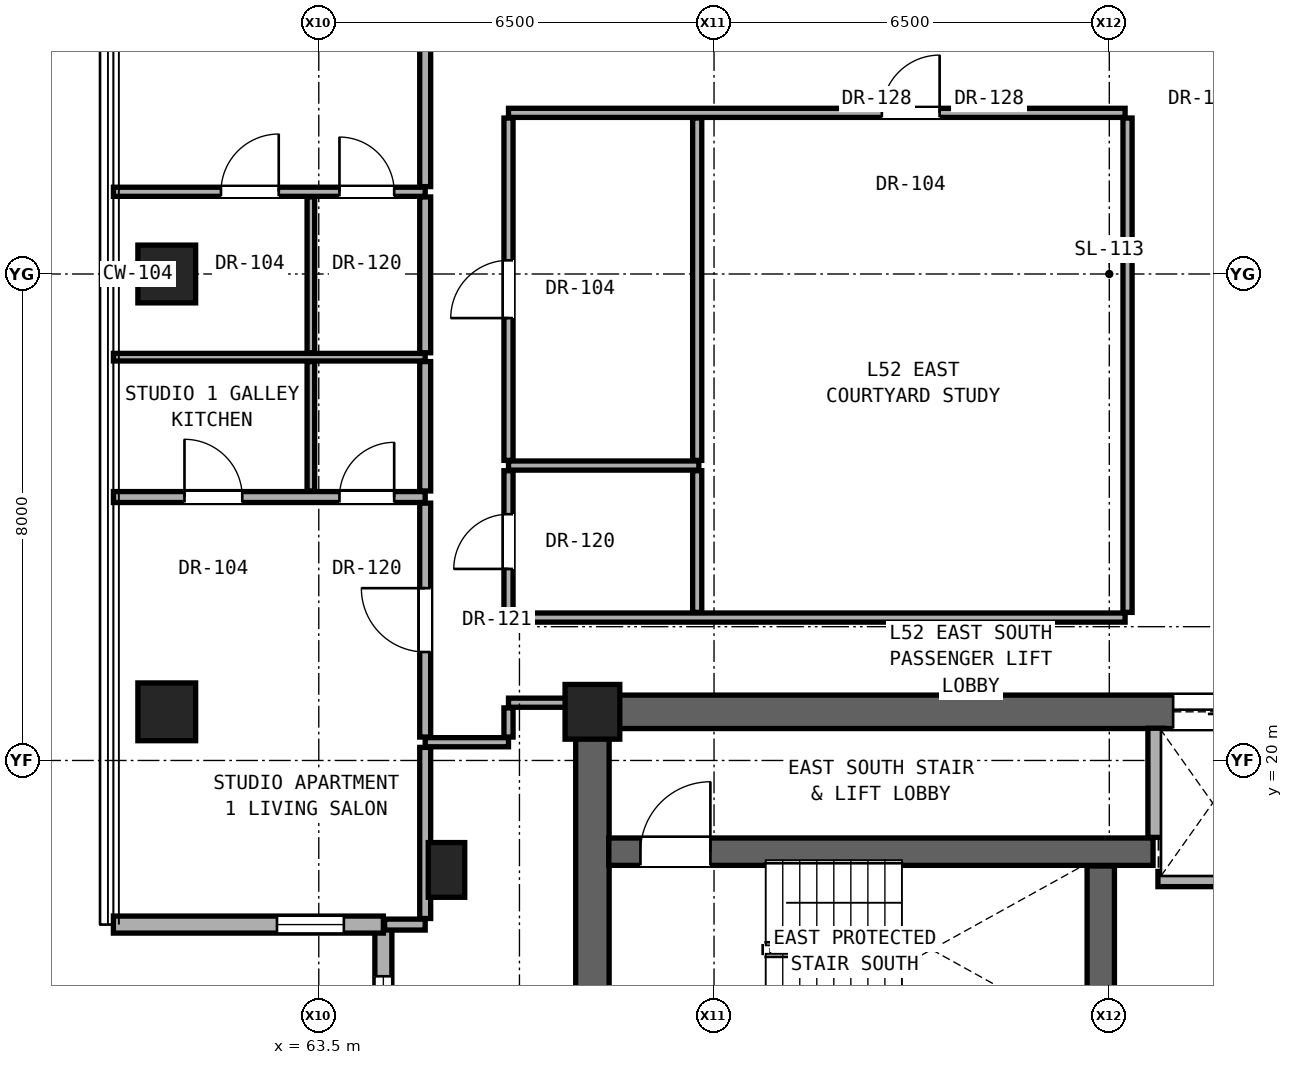
"""IFC4 building model, lengths in metres.
Left out: names, types, materials, properties, quantities, classifications, styles, units other than length and angle.
Written with IfcOpenShell. Run it as: python <this file> out.ifc"""

import sys

from ifc_helpers import new_model, si_unit, direction, frame, frame_2d, origin, origin_2d, place, context, subcontext, project, spatial, rectangle, hollow_rectangle, extrude, element, fill, save


model = new_model("IFC4")
c1 = context("Model", 3, precision=1e-05, world=origin(), true_north=direction((0.0, 1.0)))
c2 = subcontext(c1, "Body", "Model", "MODEL_VIEW")
j1 = project(units=[si_unit("LENGTHUNIT", "METRE"), si_unit("PLANEANGLEUNIT", "RADIAN")], contexts=[c1])
p1 = place(None, origin())
s1 = spatial("IfcSite", under=j1, at=p1, CompositionType="ELEMENT")
p2 = place(p1, origin())
s2 = spatial("IfcBuilding", under=s1, at=p2, CompositionType="ELEMENT")
p3 = place(p2, frame((0.0, 0.0, 183.65)))
s3 = spatial("IfcBuildingStorey", under=s2, at=p3, CompositionType="ELEMENT", Elevation=183.65)
p4 = place(p3, frame((68.0, 20.8, 0.0), z_axis=(0.0, 0.0, 1.0), x_axis=(1.0, 0.0, 0.0)))
e1 = element("IfcColumn", 1, at=p4, inside=s3, PredefinedType="COLUMN", context=c2, shape_type="SweptSolid", body=[
    extrude(rectangle(XDim=0.9, YDim=0.9, at=origin_2d()), origin(), (0.0, 0.0, 1.0), 3.25),
])
for number, where, z_axis, x_axis in (
    (2, (61.0, 20.8, 0.0), (0.0, 0.0, 1.0), (1.0, 0.0, 0.0)),
    (3, (61.0, 28.0, 0.0), (0.0, 0.0, 1.0), (1.0, 0.0, 0.0)),
):
    element("IfcColumn", number, at=place(p3, frame(where, z_axis=z_axis, x_axis=x_axis)), inside=s3, PredefinedType="COLUMN", context=c2, shape_type="SweptSolid", body=[
        extrude(hollow_rectangle(XDim=0.95, YDim=0.95, WallThickness=0.05, at=origin_2d()), origin(), (0.0, 0.0, 1.0), 3.25),
    ])
p5 = place(p3, frame((65.6, 18.2, 0.0), z_axis=(0.0, 0.0, 1.0), x_axis=(1.0, 0.0, 0.0)))
e4 = element("IfcColumn", 4, at=p5, inside=s3, PredefinedType="PILASTER", context=c2, shape_type="SweptSolid", body=[
    extrude(rectangle(XDim=0.6, YDim=0.9, at=origin_2d()), origin(), (0.0, 0.0, 1.0), 3.25),
])
p6 = place(p3, frame((68.0, 15.2, 0.0), z_axis=(0.0, 0.0, 1.0), x_axis=(0.0, 1.0, 0.0)))
e5 = element("IfcWall", 5, at=p6, inside=s3, PredefinedType="SHEAR", context=c2, shape_type="SweptSolid", body=[
    extrude(rectangle(XDim=5.6, YDim=0.55, at=frame_2d((2.8, 0.0))), origin(), (0.0, 0.0, 1.0), 3.05),
])
p7 = place(p3, frame((68.0, 20.8, 0.0), z_axis=(0.0, 0.0, 1.0), x_axis=(1.0, 0.0, 0.0)))
e6 = element("IfcWall", 6, at=p7, inside=s3, PredefinedType="SHEAR", context=c2, shape_type="SweptSolid", body=[
    extrude(rectangle(XDim=17.0, YDim=0.55, at=frame_2d((8.5, 0.0))), origin(), (0.0, 0.0, 1.0), 3.05),
])
p8 = place(p7, frame((9.55, 0.0, 0.0)))
e7 = element("IfcOpeningElement", 7, at=p8, cuts=e6, PredefinedType="OPENING", context=c2, shape_type="SweptSolid", body=[
    extrude(rectangle(XDim=1.3, YDim=2.3, at=frame_2d((0.65, 1.15))), frame((0.0, 0.285, 0.0), z_axis=(0.0, -1.0, 0.0), x_axis=(1.0, 0.0, 0.0)), (0.0, 0.0, 1.0), 0.57),
])
p9 = place(p7, frame((12.05, 0.0, 0.0)))
e8 = element("IfcOpeningElement", 8, at=p9, cuts=e6, PredefinedType="OPENING", context=c2, shape_type="SweptSolid", body=[
    extrude(rectangle(XDim=1.3, YDim=2.3, at=frame_2d((0.65, 1.15))), frame((0.0, 0.285, 0.0), z_axis=(0.0, -1.0, 0.0), x_axis=(1.0, 0.0, 0.0)), (0.0, 0.0, 1.0), 0.57),
])
p10 = place(p3, frame((64.562, 17.301, 0.0), z_axis=(0.0, 0.0, 1.0), x_axis=(0.0, -1.0, 0.0)))
e9 = element("IfcWall", 9, at=p10, inside=s3, PredefinedType="SOLIDWALL", context=c2, shape_type="SweptSolid", body=[
    extrude(rectangle(XDim=4.44, YDim=0.28, at=frame_2d((2.22, 0.0))), origin(), (0.0, 0.0, 1.0), 3.03),
])
p11 = place(p10, frame((0.85, 0.0, 0.68)))
e10 = element("IfcOpeningElement", 10, at=p11, cuts=e9, PredefinedType="OPENING", context=c2, shape_type="SweptSolid", body=[
    extrude(rectangle(XDim=2.1, YDim=2.2, at=frame_2d((1.05, 1.1))), frame((0.0, 0.15, 0.0), z_axis=(0.0, -1.0, 0.0), x_axis=(1.0, 0.0, 0.0)), (0.0, 0.0, 1.0), 0.3),
])
p12 = place(p3, frame((60.123, 17.301, 0.0), z_axis=(0.0, 0.0, 1.0), x_axis=(1.0, 0.0, 0.0)))
e11 = element("IfcWall", 11, at=p12, inside=s3, PredefinedType="SOLIDWALL", context=c2, shape_type="SweptSolid", body=[
    extrude(rectangle(XDim=4.44, YDim=0.28, at=frame_2d((2.22, 0.0))), origin(), (0.0, 0.0, 1.0), 3.03),
])
p13 = place(p12, frame((2.69, 0.0, 0.85)))
e12 = element("IfcOpeningElement", 12, at=p13, cuts=e11, PredefinedType="OPENING", context=c2, shape_type="SweptSolid", body=[
    extrude(rectangle(XDim=1.1, YDim=2.0, at=frame_2d((0.55, 1.0))), frame((0.0, 0.15, 0.0), z_axis=(0.0, -1.0, 0.0), x_axis=(1.0, 0.0, 0.0)), (0.0, 0.0, 1.0), 0.3),
])
p14 = place(p3, frame((64.582, 17.301, 0.0), z_axis=(0.0, 0.0, 1.0), x_axis=(1.0, 0.0, 0.0)))
e13 = element("IfcWall", 13, at=p14, inside=s3, PredefinedType="PARTITIONING", context=c2, shape_type="SweptSolid", body=[
    extrude(rectangle(XDim=0.668, YDim=0.18, at=frame_2d((0.334, 0.0))), origin(), (0.0, 0.0, 1.0), 3.05),
])
p15 = place(p3, frame((77.3, 18.05, 0.0), z_axis=(0.0, 0.0, 1.0), x_axis=(1.0, 0.0, 0.0)))
e14 = element("IfcWall", 14, at=p15, inside=s3, PredefinedType="SOLIDWALL", context=c2, shape_type="SweptSolid", body=[
    extrude(rectangle(XDim=4.35, YDim=0.25, at=frame_2d((2.175, 0.0))), origin(), (0.0, 0.0, 1.0), 3.05),
])
p16 = place(p3, frame((68.27, 18.5, 0.0), z_axis=(0.0, 0.0, 1.0), x_axis=(1.0, 0.0, 0.0)))
e15 = element("IfcWall", 15, at=p16, inside=s3, PredefinedType="SHEAR", context=c2, shape_type="SweptSolid", body=[
    extrude(rectangle(XDim=8.95, YDim=0.45, at=frame_2d((4.475, 0.0))), origin(), (0.0, 0.0, 1.0), 3.05),
])
p17 = place(p16, frame((0.52, 0.0, 0.0)))
e16 = element("IfcOpeningElement", 16, at=p17, cuts=e15, PredefinedType="OPENING", context=c2, shape_type="SweptSolid", body=[
    extrude(rectangle(XDim=1.15, YDim=2.2, at=frame_2d((0.575, 1.1))), frame((0.0, 0.235, 0.0), z_axis=(0.0, -1.0, 0.0), x_axis=(1.0, 0.0, 0.0)), (0.0, 0.0, 1.0), 0.47),
])
p18 = place(p3, frame((65.25, 20.3, 0.0), z_axis=(0.0, 0.0, 1.0), x_axis=(1.0, 0.0, 0.0)))
e17 = element("IfcWall", 17, at=p18, inside=s3, PredefinedType="PARTITIONING", context=c2, shape_type="SweptSolid", body=[
    extrude(rectangle(XDim=1.37, YDim=0.15, at=frame_2d((0.685, 0.0))), origin(), (0.0, 0.0, 1.0), 3.05),
])
p19 = place(p3, frame((66.62, 20.95, 0.0), z_axis=(0.0, 0.0, 1.0), x_axis=(1.0, 0.0, 0.0)))
e18 = element("IfcWall", 18, at=p19, inside=s3, PredefinedType="PARTITIONING", context=c2, shape_type="SweptSolid", body=[
    extrude(rectangle(XDim=1.11, YDim=0.15, at=frame_2d((0.555, 0.0))), origin(), (0.0, 0.0, 1.0), 2.442),
])
p20 = place(p3, frame((66.62, 22.35, 0.0), z_axis=(0.0, 0.0, 1.0), x_axis=(1.0, 0.0, 0.0)))
e19 = element("IfcWall", 19, at=p20, inside=s3, PredefinedType="PARTITIONING", context=c2, shape_type="SweptSolid", body=[
    extrude(rectangle(XDim=10.14, YDim=0.15, at=frame_2d((5.07, 0.0))), origin(), (0.0, 0.0, 1.0), 2.186),
])
p21 = place(p3, frame((60.123, 24.332, 0.0), z_axis=(0.0, 0.0, 1.0), x_axis=(1.0, 0.0, 0.0)))
e20 = element("IfcWall", 20, at=p21, inside=s3, PredefinedType="PARTITIONING", context=c2, shape_type="SweptSolid", body=[
    extrude(rectangle(XDim=5.127, YDim=0.18, at=frame_2d((2.563, 0.0))), origin(), (0.0, 0.0, 1.0), 2.269),
])
p22 = place(p21, frame((1.168, 0.0, 0.0)))
e21 = element("IfcOpeningElement", 21, at=p22, cuts=e20, PredefinedType="OPENING", context=c2, shape_type="SweptSolid", body=[
    extrude(rectangle(XDim=0.95, YDim=2.15, at=frame_2d((0.475, 1.075))), frame((0.0, 0.1, 0.0), z_axis=(0.0, -1.0, 0.0), x_axis=(1.0, 0.0, 0.0)), (0.0, 0.0, 1.0), 0.2),
])
p23 = place(p21, frame((3.717, 0.0, 0.0)))
e22 = element("IfcOpeningElement", 22, at=p23, cuts=e20, PredefinedType="OPENING", context=c2, shape_type="SweptSolid", body=[
    extrude(rectangle(XDim=0.9, YDim=2.1, at=frame_2d((0.45, 1.05))), frame((0.0, 0.1, 0.0), z_axis=(0.0, -1.0, 0.0), x_axis=(1.0, 0.0, 0.0)), (0.0, 0.0, 1.0), 0.2),
])
p24 = place(p3, frame((66.62, 24.85, 0.0), z_axis=(0.0, 0.0, 1.0), x_axis=(1.0, 0.0, 0.0)))
e23 = element("IfcWall", 23, at=p24, inside=s3, PredefinedType="PARTITIONING", context=c2, shape_type="SweptSolid", body=[
    extrude(rectangle(XDim=3.13, YDim=0.15, at=frame_2d((1.565, 0.0))), origin(), (0.0, 0.0, 1.0), 2.186),
])
p25 = place(p3, frame((60.123, 26.632, 0.0), z_axis=(0.0, 0.0, 1.0), x_axis=(1.0, 0.0, 0.0)))
e24 = element("IfcWall", 24, at=p25, inside=s3, PredefinedType="PARTITIONING", context=c2, shape_type="SweptSolid", body=[
    extrude(rectangle(XDim=5.127, YDim=0.125, at=frame_2d((2.563, 0.0))), origin(), (0.0, 0.0, 1.0), 2.269),
])
p26 = place(p3, frame((60.123, 29.352, 0.0), z_axis=(0.0, 0.0, 1.0), x_axis=(1.0, 0.0, 0.0)))
e25 = element("IfcWall", 25, at=p26, inside=s3, PredefinedType="PARTITIONING", context=c2, shape_type="SweptSolid", body=[
    extrude(rectangle(XDim=5.127, YDim=0.15, at=frame_2d((2.563, 0.0))), origin(), (0.0, 0.0, 1.0), 2.269),
])
p27 = place(p26, frame((1.769, 0.0, 0.0)))
e26 = element("IfcOpeningElement", 26, at=p27, cuts=e25, PredefinedType="OPENING", context=c2, shape_type="SweptSolid", body=[
    extrude(rectangle(XDim=0.95, YDim=2.15, at=frame_2d((0.475, 1.075))), frame((0.0, 0.085, 0.0), z_axis=(0.0, -1.0, 0.0), x_axis=(1.0, 0.0, 0.0)), (0.0, 0.0, 1.0), 0.17),
])
p28 = place(p26, frame((3.717, 0.0, 0.0)))
e27 = element("IfcOpeningElement", 27, at=p28, cuts=e25, PredefinedType="OPENING", context=c2, shape_type="SweptSolid", body=[
    extrude(rectangle(XDim=0.9, YDim=2.1, at=frame_2d((0.45, 1.05))), frame((0.0, 0.085, 0.0), z_axis=(0.0, -1.0, 0.0), x_axis=(1.0, 0.0, 0.0)), (0.0, 0.0, 1.0), 0.17),
])
p29 = place(p3, frame((66.62, 30.65, 0.0), z_axis=(0.0, 0.0, 1.0), x_axis=(1.0, 0.0, 0.0)))
e28 = element("IfcWall", 28, at=p29, inside=s3, PredefinedType="PARTITIONING", context=c2, shape_type="SweptSolid", body=[
    extrude(rectangle(XDim=10.14, YDim=0.15, at=frame_2d((5.07, 0.0))), origin(), (0.0, 0.0, 1.0), 2.186),
])
p30 = place(p29, frame((6.14, 0.0, 0.0)))
e29 = element("IfcOpeningElement", 29, at=p30, cuts=e28, PredefinedType="OPENING", context=c2, shape_type="SweptSolid", body=[
    extrude(rectangle(XDim=0.95, YDim=2.15, at=frame_2d((0.475, 1.075))), frame((0.0, 0.085, 0.0), z_axis=(0.0, -1.0, 0.0), x_axis=(1.0, 0.0, 0.0)), (0.0, 0.0, 1.0), 0.17),
])
p31 = place(p3, frame((63.37, 24.432, 0.0), z_axis=(0.0, 0.0, 1.0), x_axis=(0.0, 1.0, 0.0)))
e30 = element("IfcWall", 30, at=p31, inside=s3, PredefinedType="PARTITIONING", context=c2, shape_type="SweptSolid", body=[
    extrude(rectangle(XDim=2.128, YDim=0.125, at=frame_2d((1.064, 0.0))), origin(), (0.0, 0.0, 1.0), 3.05),
])
p32 = place(p3, frame((63.37, 26.705, 0.0), z_axis=(0.0, 0.0, 1.0), x_axis=(0.0, 1.0, 0.0)))
e31 = element("IfcWall", 31, at=p32, inside=s3, PredefinedType="PARTITIONING", context=c2, shape_type="SweptSolid", body=[
    extrude(rectangle(XDim=2.562, YDim=0.125, at=frame_2d((1.281, 0.0))), origin(), (0.0, 0.0, 1.0), 2.346),
])
p33 = place(p3, frame((65.25, 17.401, 0.0), z_axis=(0.0, 0.0, 1.0), x_axis=(0.0, 1.0, 0.0)))
e32 = element("IfcWall", 32, at=p33, inside=s3, PredefinedType="PARTITIONING", context=c2, shape_type="SweptSolid", body=[
    extrude(rectangle(XDim=2.814, YDim=0.18, at=frame_2d((1.407, 0.0))), origin(), (0.0, 0.0, 1.0), 2.493),
])
p34 = place(p3, frame((65.25, 20.385, 0.0), z_axis=(0.0, 0.0, 1.0), x_axis=(0.0, 1.0, 0.0)))
e33 = element("IfcWall", 33, at=p34, inside=s3, PredefinedType="PARTITIONING", context=c2, shape_type="SweptSolid", body=[
    extrude(rectangle(XDim=3.847, YDim=0.18, at=frame_2d((1.923, 0.0))), origin(), (0.0, 0.0, 1.0), 2.442),
])
p35 = place(p34, frame((1.398, 0.0, 0.0)))
e34 = element("IfcOpeningElement", 34, at=p35, cuts=e33, PredefinedType="OPENING", context=c2, shape_type="SweptSolid", body=[
    extrude(rectangle(XDim=1.05, YDim=2.2, at=frame_2d((0.525, 1.1))), frame((0.0, 0.1, 0.0), z_axis=(0.0, -1.0, 0.0), x_axis=(1.0, 0.0, 0.0)), (0.0, 0.0, 1.0), 0.2),
])
p36 = place(p3, frame((65.25, 24.432, 0.0), z_axis=(0.0, 0.0, 1.0), x_axis=(0.0, 1.0, 0.0)))
e35 = element("IfcWall", 35, at=p36, inside=s3, PredefinedType="PARTITIONING", context=c2, shape_type="SweptSolid", body=[
    extrude(rectangle(XDim=2.128, YDim=0.18, at=frame_2d((1.064, 0.0))), origin(), (0.0, 0.0, 1.0), 3.05),
])
p37 = place(p3, frame((65.25, 26.705, 0.0), z_axis=(0.0, 0.0, 1.0), x_axis=(0.0, 1.0, 0.0)))
e36 = element("IfcWall", 36, at=p37, inside=s3, PredefinedType="PARTITIONING", context=c2, shape_type="SweptSolid", body=[
    extrude(rectangle(XDim=2.562, YDim=0.18, at=frame_2d((1.281, 0.0))), origin(), (0.0, 0.0, 1.0), 2.346),
])
p38 = place(p3, frame((65.25, 29.437, 0.0), z_axis=(0.0, 0.0, 1.0), x_axis=(0.0, 1.0, 0.0)))
e37 = element("IfcWall", 37, at=p38, inside=s3, PredefinedType="PARTITIONING", context=c2, shape_type="SweptSolid", body=[
    extrude(rectangle(XDim=6.178, YDim=0.18, at=frame_2d((3.089, 0.0))), origin(), (0.0, 0.0, 1.0), 2.442),
])
p39 = place(p38, frame((2.564, 0.0, 0.0)))
e38 = element("IfcOpeningElement", 38, at=p39, cuts=e37, PredefinedType="OPENING", context=c2, shape_type="SweptSolid", body=[
    extrude(rectangle(XDim=1.05, YDim=2.2, at=frame_2d((0.525, 1.1))), frame((0.0, 0.1, 0.0), z_axis=(0.0, -1.0, 0.0), x_axis=(1.0, 0.0, 0.0)), (0.0, 0.0, 1.0), 0.2),
])
p40 = place(p3, frame((66.62, 20.385, 0.0), z_axis=(0.0, 0.0, 1.0), x_axis=(0.0, 1.0, 0.0)))
e39 = element("IfcWall", 39, at=p40, inside=s3, PredefinedType="PARTITIONING", context=c2, shape_type="SweptSolid", body=[
    extrude(rectangle(XDim=0.48, YDim=0.15, at=frame_2d((0.24, 0.0))), origin(), (0.0, 0.0, 1.0), 2.442),
])
p41 = place(p3, frame((66.62, 22.435, 0.0), z_axis=(0.0, 0.0, 1.0), x_axis=(0.0, 1.0, 0.0)))
e40 = element("IfcWall", 40, at=p41, inside=s3, PredefinedType="PARTITIONING", context=c2, shape_type="SweptSolid", body=[
    extrude(rectangle(XDim=2.33, YDim=0.15, at=frame_2d((1.165, 0.0))), origin(), (0.0, 0.0, 1.0), 3.05),
])
p42 = place(p41, frame((0.715, 0.0, 0.0)))
e41 = element("IfcOpeningElement", 41, at=p42, cuts=e40, PredefinedType="OPENING", context=c2, shape_type="SweptSolid", body=[
    extrude(rectangle(XDim=0.9, YDim=2.1, at=frame_2d((0.45, 1.05))), frame((0.0, 0.085, 0.0), z_axis=(0.0, -1.0, 0.0), x_axis=(1.0, 0.0, 0.0)), (0.0, 0.0, 1.0), 0.17),
])
p43 = place(p3, frame((66.62, 24.935, 0.0), z_axis=(0.0, 0.0, 1.0), x_axis=(0.0, 1.0, 0.0)))
e42 = element("IfcWall", 42, at=p43, inside=s3, PredefinedType="PARTITIONING", context=c2, shape_type="SweptSolid", body=[
    extrude(rectangle(XDim=5.63, YDim=0.15, at=frame_2d((2.815, 0.0))), origin(), (0.0, 0.0, 1.0), 2.346),
])
p44 = place(p43, frame((2.34, 0.0, 0.0)))
e43 = element("IfcOpeningElement", 43, at=p44, cuts=e42, PredefinedType="OPENING", context=c2, shape_type="SweptSolid", body=[
    extrude(rectangle(XDim=0.95, YDim=2.15, at=frame_2d((0.475, 1.075))), frame((0.0, 0.085, 0.0), z_axis=(0.0, -1.0, 0.0), x_axis=(1.0, 0.0, 0.0)), (0.0, 0.0, 1.0), 0.17),
])
p45 = place(p3, frame((69.723, 22.435, 0.0), z_axis=(0.0, 0.0, 1.0), x_axis=(0.0, 1.0, 0.0)))
e44 = element("IfcWall", 44, at=p45, inside=s3, PredefinedType="PARTITIONING", context=c2, shape_type="SweptSolid", body=[
    extrude(rectangle(XDim=2.33, YDim=0.15, at=frame_2d((1.165, 0.0))), origin(), (0.0, 0.0, 1.0), 3.05),
])
p46 = place(p3, frame((69.723, 24.935, 0.0), z_axis=(0.0, 0.0, 1.0), x_axis=(0.0, 1.0, 0.0)))
e45 = element("IfcWall", 45, at=p46, inside=s3, PredefinedType="PARTITIONING", context=c2, shape_type="SweptSolid", body=[
    extrude(rectangle(XDim=5.63, YDim=0.15, at=frame_2d((2.815, 0.0))), origin(), (0.0, 0.0, 1.0), 2.186),
])
p47 = place(p3, frame((76.36, 15.665, 0.0), z_axis=(0.0, 0.0, 1.0), x_axis=(0.0, 1.0, 0.0)))
e46 = element("IfcWall", 46, at=p47, inside=s3, PredefinedType="SHEAR", context=c2, shape_type="SweptSolid", body=[
    extrude(rectangle(XDim=2.6, YDim=0.45, at=frame_2d((1.3, 0.0))), origin(), (0.0, 0.0, 1.0), 3.05),
])
p48 = place(p3, frame((76.8, 22.435, 0.0), z_axis=(0.0, 0.0, 1.0), x_axis=(0.0, 1.0, 0.0)))
e47 = element("IfcWall", 47, at=p48, inside=s3, PredefinedType="PARTITIONING", context=c2, shape_type="SweptSolid", body=[
    extrude(rectangle(XDim=8.13, YDim=0.15, at=frame_2d((4.065, 0.0))), origin(), (0.0, 0.0, 1.0), 2.186),
])
p49 = place(p3, frame((77.26, 18.735, 0.0), z_axis=(0.0, 0.0, 1.0), x_axis=(0.0, 1.0, 0.0)))
e48 = element("IfcWall", 48, at=p49, inside=s3, PredefinedType="SOLIDWALL", context=c2, shape_type="SweptSolid", body=[
    extrude(rectangle(XDim=1.795, YDim=0.25, at=frame_2d((0.897, 0.0))), origin(), (0.0, 0.0, 1.0), 3.05),
])
p50 = place(p11, origin())
e49 = element("IfcWindow", 49, at=p50, inside=s3, PartitioningType="SINGLE_PANEL", PredefinedType="WINDOW", context=c2, shape_type="SweptSolid", body=[
    extrude(rectangle(XDim=2.1, YDim=2.2, at=frame_2d((1.05, 1.1))), frame((0.0, 0.03, 0.0), z_axis=(0.0, -1.0, 0.0), x_axis=(1.0, 0.0, 0.0)), (0.0, 0.0, 1.0), 0.06),
])
fill(e10, e49)
p51 = place(p13, origin())
e50 = element("IfcWindow", 50, at=p51, inside=s3, PartitioningType="SINGLE_PANEL", PredefinedType="WINDOW", context=c2, shape_type="SweptSolid", body=[
    extrude(rectangle(XDim=1.1, YDim=2.0, at=frame_2d((0.55, 1.0))), frame((0.0, 0.03, 0.0), z_axis=(0.0, -1.0, 0.0), x_axis=(1.0, 0.0, 0.0)), (0.0, 0.0, 1.0), 0.06),
])
fill(e12, e50)
p52 = place(p17, origin())
e51 = element("IfcDoor", 51, at=p52, inside=s3, OperationType="SINGLE_SWING_RIGHT", PredefinedType="DOOR", context=c2, shape_type="SweptSolid", body=[
    extrude(rectangle(XDim=1.15, YDim=2.2, at=frame_2d((0.575, 1.1))), frame((0.0, 0.025, 0.0), z_axis=(0.0, -1.0, 0.0), x_axis=(1.0, 0.0, 0.0)), (0.0, 0.0, 1.0), 0.05),
])
fill(e16, e51)
p53 = place(p42, origin())
e52 = element("IfcDoor", 52, at=p53, inside=s3, OperationType="SINGLE_SWING_LEFT", PredefinedType="DOOR", context=c2, shape_type="SweptSolid", body=[
    extrude(rectangle(XDim=0.9, YDim=2.1, at=frame_2d((0.45, 1.05))), frame((0.0, 0.025, 0.0), z_axis=(0.0, -1.0, 0.0), x_axis=(1.0, 0.0, 0.0)), (0.0, 0.0, 1.0), 0.05),
])
fill(e41, e52)
p54 = place(p35, origin())
e53 = element("IfcDoor", 53, at=p54, inside=s3, OperationType="SINGLE_SWING_RIGHT", PredefinedType="DOOR", context=c2, shape_type="SweptSolid", body=[
    extrude(rectangle(XDim=1.05, YDim=2.2, at=frame_2d((0.525, 1.1))), frame((0.0, 0.025, 0.0), z_axis=(0.0, -1.0, 0.0), x_axis=(1.0, 0.0, 0.0)), (0.0, 0.0, 1.0), 0.05),
])
fill(e34, e53)
p55 = place(p22, origin())
e54 = element("IfcDoor", 54, at=p55, inside=s3, OperationType="SINGLE_SWING_LEFT", PredefinedType="DOOR", context=c2, shape_type="SweptSolid", body=[
    extrude(rectangle(XDim=0.95, YDim=2.15, at=frame_2d((0.475, 1.075))), frame((0.0, 0.025, 0.0), z_axis=(0.0, -1.0, 0.0), x_axis=(1.0, 0.0, 0.0)), (0.0, 0.0, 1.0), 0.05),
])
fill(e21, e54)
p56 = place(p23, origin())
e55 = element("IfcDoor", 55, at=p56, inside=s3, OperationType="SINGLE_SWING_RIGHT", PredefinedType="DOOR", context=c2, shape_type="SweptSolid", body=[
    extrude(rectangle(XDim=0.9, YDim=2.1, at=frame_2d((0.45, 1.05))), frame((0.0, 0.025, 0.0), z_axis=(0.0, -1.0, 0.0), x_axis=(1.0, 0.0, 0.0)), (0.0, 0.0, 1.0), 0.05),
])
fill(e22, e55)
p57 = place(p27, origin())
e56 = element("IfcDoor", 56, at=p57, inside=s3, OperationType="SINGLE_SWING_RIGHT", PredefinedType="DOOR", context=c2, shape_type="SweptSolid", body=[
    extrude(rectangle(XDim=0.95, YDim=2.15, at=frame_2d((0.475, 1.075))), frame((0.0, 0.025, 0.0), z_axis=(0.0, -1.0, 0.0), x_axis=(1.0, 0.0, 0.0)), (0.0, 0.0, 1.0), 0.05),
])
fill(e26, e56)
p58 = place(p28, origin())
e57 = element("IfcDoor", 57, at=p58, inside=s3, OperationType="SINGLE_SWING_LEFT", PredefinedType="DOOR", context=c2, shape_type="SweptSolid", body=[
    extrude(rectangle(XDim=0.9, YDim=2.1, at=frame_2d((0.45, 1.05))), frame((0.0, 0.025, 0.0), z_axis=(0.0, -1.0, 0.0), x_axis=(1.0, 0.0, 0.0)), (0.0, 0.0, 1.0), 0.05),
])
fill(e27, e57)
p59 = place(p44, origin())
e58 = element("IfcDoor", 58, at=p59, inside=s3, OperationType="SINGLE_SWING_LEFT", PredefinedType="DOOR", context=c2, shape_type="SweptSolid", body=[
    extrude(rectangle(XDim=0.95, YDim=2.15, at=frame_2d((0.475, 1.075))), frame((0.0, 0.025, 0.0), z_axis=(0.0, -1.0, 0.0), x_axis=(1.0, 0.0, 0.0)), (0.0, 0.0, 1.0), 0.05),
])
fill(e43, e58)
p60 = place(p30, origin())
e59 = element("IfcDoor", 59, at=p60, inside=s3, OperationType="SINGLE_SWING_RIGHT", PredefinedType="DOOR", context=c2, shape_type="SweptSolid", body=[
    extrude(rectangle(XDim=0.95, YDim=2.15, at=frame_2d((0.475, 1.075))), frame((0.0, 0.025, 0.0), z_axis=(0.0, -1.0, 0.0), x_axis=(1.0, 0.0, 0.0)), (0.0, 0.0, 1.0), 0.05),
])
fill(e29, e59)
p61 = place(p8, origin())
e60 = element("IfcDoor", 60, at=p61, inside=s3, OperationType="DOUBLE_DOOR_SLIDING", PredefinedType="DOOR", context=c2, shape_type="SweptSolid", body=[
    extrude(rectangle(XDim=1.3, YDim=2.3, at=frame_2d((0.65, 1.15))), frame((0.0, 0.025, 0.0), z_axis=(0.0, -1.0, 0.0), x_axis=(1.0, 0.0, 0.0)), (0.0, 0.0, 1.0), 0.05),
])
fill(e7, e60)
save(model, sys.argv[1])
